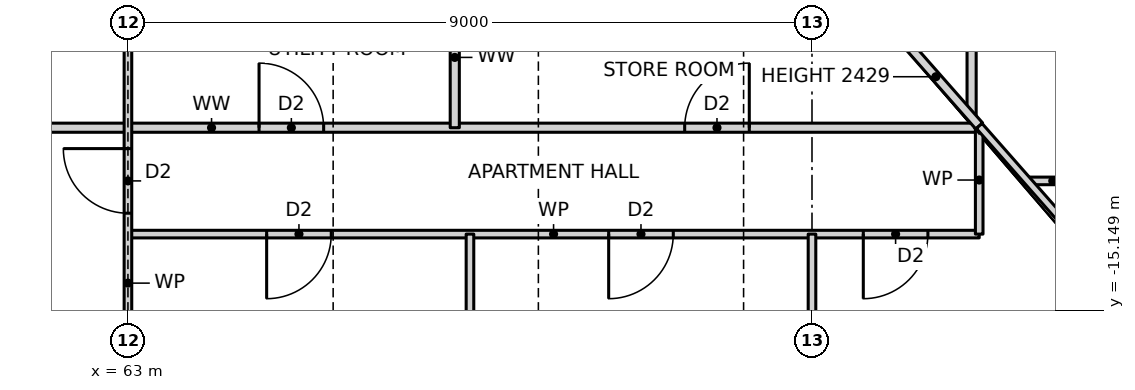
"""IFC4 building model, lengths in metres.
Left out: names, types, materials, properties, quantities, classifications, styles, units other than length and angle.
Written with IfcOpenShell. Run it as: python <this file> out.ifc"""

import sys

from ifc_helpers import new_model, si_unit, direction, frame, frame_2d, origin, place, context, subcontext, project, spatial, rectangle, extrude, element, fill, save


model = new_model("IFC4")
c1 = context("Model", 3, precision=1e-05, world=origin(), true_north=direction((0.0, 1.0)))
c2 = subcontext(c1, "Body", "Model", "MODEL_VIEW")
j1 = project(units=[si_unit("LENGTHUNIT", "METRE"), si_unit("PLANEANGLEUNIT", "RADIAN")], contexts=[c1])
p1 = place(None, origin())
s1 = spatial("IfcSite", under=j1, at=p1, CompositionType="ELEMENT")
p2 = place(p1, origin())
s2 = spatial("IfcBuilding", under=s1, at=p2, CompositionType="ELEMENT")
p3 = place(p2, frame((0.0, 0.0, 22.0)))
s3 = spatial("IfcBuildingStorey", under=s2, at=p3, CompositionType="ELEMENT", Elevation=22.0)
p4 = place(p3, frame((63.0, -14.15, 0.0), z_axis=(0.0, 0.0, 1.0), x_axis=(1.0, 0.0, 0.0)))
e1 = element("IfcWall", 1, at=p4, inside=s3, PredefinedType="PARTITIONING", context=c2, shape_type="SweptSolid", body=[
    extrude(rectangle(XDim=11.2, YDim=0.1, at=frame_2d((5.6, 0.0))), origin(), (0.0, 0.0, 1.0), 3.27),
])
p5 = place(p4, frame((1.825, 0.0, 0.0)))
e2 = element("IfcOpeningElement", 2, at=p5, cuts=e1, PredefinedType="OPENING", context=c2, shape_type="SweptSolid", body=[
    extrude(rectangle(XDim=0.85, YDim=2.1, at=frame_2d((0.425, 1.05))), frame((0.0, 0.06, 0.0), z_axis=(0.0, -1.0, 0.0), x_axis=(1.0, 0.0, 0.0)), (0.0, 0.0, 1.0), 0.12),
])
p6 = place(p4, frame((6.325, 0.0, 0.0)))
e3 = element("IfcOpeningElement", 3, at=p6, cuts=e1, PredefinedType="OPENING", context=c2, shape_type="SweptSolid", body=[
    extrude(rectangle(XDim=0.85, YDim=2.1, at=frame_2d((0.425, 1.05))), frame((0.0, 0.06, 0.0), z_axis=(0.0, -1.0, 0.0), x_axis=(1.0, 0.0, 0.0)), (0.0, 0.0, 1.0), 0.12),
])
p7 = place(p4, frame((9.675, 0.0, 0.0)))
e4 = element("IfcOpeningElement", 4, at=p7, cuts=e1, PredefinedType="OPENING", context=c2, shape_type="SweptSolid", body=[
    extrude(rectangle(XDim=0.85, YDim=2.1, at=frame_2d((0.425, 1.05))), frame((0.0, 0.06, 0.0), z_axis=(0.0, -1.0, 0.0), x_axis=(1.0, 0.0, 0.0)), (0.0, 0.0, 1.0), 0.12),
])
p8 = place(p3, frame((74.836, -13.45, 0.0), z_axis=(0.0, 0.0, 1.0), x_axis=(1.0, 0.0, 0.0)))
e5 = element("IfcWall", 5, at=p8, inside=s3, PredefinedType="PARTITIONING", context=c2, shape_type="SweptSolid", body=[
    extrude(rectangle(XDim=0.664, YDim=0.1, at=frame_2d((0.332, 0.0))), origin(), (0.0, 0.0, 1.0), 3.27),
])
p9 = place(p3, frame((54.0, -12.75, 0.0), z_axis=(0.0, 0.0, 1.0), x_axis=(1.0, 0.0, 0.0)))
e6 = element("IfcWall", 6, at=p9, inside=s3, PredefinedType="PARTITIONING", context=c2, shape_type="SweptSolid", body=[
    extrude(rectangle(XDim=20.2, YDim=0.12, at=frame_2d((10.1, 0.0))), origin(), (0.0, 0.0, 1.0), 3.27),
])
p10 = place(p9, frame((1.375, 0.0, 0.0)))
e7 = element("IfcOpeningElement", 7, at=p10, cuts=e6, PredefinedType="OPENING", context=c2, shape_type="SweptSolid", body=[
    extrude(rectangle(XDim=0.85, YDim=2.1, at=frame_2d((0.425, 1.05))), frame((0.0, 0.07, 0.0), z_axis=(0.0, -1.0, 0.0), x_axis=(1.0, 0.0, 0.0)), (0.0, 0.0, 1.0), 0.14),
])
p11 = place(p9, frame((4.575, 0.0, 0.0)))
e8 = element("IfcOpeningElement", 8, at=p11, cuts=e6, PredefinedType="OPENING", context=c2, shape_type="SweptSolid", body=[
    extrude(rectangle(XDim=0.85, YDim=2.1, at=frame_2d((0.425, 1.05))), frame((0.0, 0.07, 0.0), z_axis=(0.0, -1.0, 0.0), x_axis=(1.0, 0.0, 0.0)), (0.0, 0.0, 1.0), 0.14),
])
p12 = place(p9, frame((10.725, 0.0, 0.0)))
e9 = element("IfcOpeningElement", 9, at=p12, cuts=e6, PredefinedType="OPENING", context=c2, shape_type="SweptSolid", body=[
    extrude(rectangle(XDim=0.85, YDim=2.1, at=frame_2d((0.425, 1.05))), frame((0.0, 0.07, 0.0), z_axis=(0.0, -1.0, 0.0), x_axis=(1.0, 0.0, 0.0)), (0.0, 0.0, 1.0), 0.14),
])
p13 = place(p9, frame((16.325, 0.0, 0.0)))
e10 = element("IfcOpeningElement", 10, at=p13, cuts=e6, PredefinedType="OPENING", context=c2, shape_type="SweptSolid", body=[
    extrude(rectangle(XDim=0.85, YDim=2.1, at=frame_2d((0.425, 1.05))), frame((0.0, 0.07, 0.0), z_axis=(0.0, -1.0, 0.0), x_axis=(1.0, 0.0, 0.0)), (0.0, 0.0, 1.0), 0.14),
])
p14 = place(p3, frame((74.2, -14.15, 0.0), z_axis=(0.0, 0.0, 1.0), x_axis=(0.0, 1.0, 0.0)))
e11 = element("IfcWall", 11, at=p14, inside=s3, PredefinedType="PARTITIONING", context=c2, shape_type="SweptSolid", body=[
    extrude(rectangle(XDim=1.423, YDim=0.1, at=frame_2d((0.711, 0.0))), origin(), (0.0, 0.0, 1.0), 3.27),
])
p15 = place(p3, frame((74.1, -12.614, 0.0), z_axis=(0.0, 0.0, 1.0), x_axis=(0.0, 1.0, 0.0)))
e12 = element("IfcWall", 12, at=p15, inside=s3, PredefinedType="PARTITIONING", context=c2, shape_type="SweptSolid", body=[
    extrude(rectangle(XDim=25.228, YDim=0.12, at=frame_2d((12.614, 0.0))), origin(), (0.0, 0.0, 1.0), 3.27),
])
p16 = place(p15, frame((7.239, 0.0, 0.0)))
e13 = element("IfcOpeningElement", 13, at=p16, cuts=e12, PredefinedType="OPENING", context=c2, shape_type="SweptSolid", body=[
    extrude(rectangle(XDim=0.85, YDim=2.1, at=frame_2d((0.425, 1.05))), frame((0.0, 0.07, 0.0), z_axis=(0.0, -1.0, 0.0), x_axis=(1.0, 0.0, 0.0)), (0.0, 0.0, 1.0), 0.14),
])
p17 = place(p15, frame((10.439, 0.0, 0.0)))
e14 = element("IfcOpeningElement", 14, at=p17, cuts=e12, PredefinedType="OPENING", context=c2, shape_type="SweptSolid", body=[
    extrude(rectangle(XDim=0.85, YDim=2.1, at=frame_2d((0.425, 1.05))), frame((0.0, 0.07, 0.0), z_axis=(0.0, -1.0, 0.0), x_axis=(1.0, 0.0, 0.0)), (0.0, 0.0, 1.0), 0.14),
])
p18 = place(p15, frame((2.507, 0.0, 0.0)))
e15 = element("IfcOpeningElement", 15, at=p18, cuts=e12, PredefinedType="OPENING", context=c2, shape_type="SweptSolid", body=[
    extrude(rectangle(XDim=0.85, YDim=2.1, at=frame_2d((0.425, 1.05))), frame((0.0, 0.07, 0.0), z_axis=(0.0, -1.0, 0.0), x_axis=(1.0, 0.0, 0.0)), (0.0, 0.0, 1.0), 0.14),
])
p19 = place(p15, frame((16.639, 0.0, 0.0)))
e16 = element("IfcOpeningElement", 16, at=p19, cuts=e12, PredefinedType="OPENING", context=c2, shape_type="SweptSolid", body=[
    extrude(rectangle(XDim=0.85, YDim=2.1, at=frame_2d((0.425, 1.05))), frame((0.0, 0.07, 0.0), z_axis=(0.0, -1.0, 0.0), x_axis=(1.0, 0.0, 0.0)), (0.0, 0.0, 1.0), 0.14),
])
p20 = place(p15, frame((21.821, 0.0, 0.0)))
e17 = element("IfcOpeningElement", 17, at=p20, cuts=e12, PredefinedType="OPENING", context=c2, shape_type="SweptSolid", body=[
    extrude(rectangle(XDim=0.85, YDim=2.1, at=frame_2d((0.425, 1.05))), frame((0.0, 0.07, 0.0), z_axis=(0.0, -1.0, 0.0), x_axis=(1.0, 0.0, 0.0)), (0.0, 0.0, 1.0), 0.14),
])
for number, where, z_axis, x_axis in (
    (18, (72.0, -18.69, 0.0), (0.0, 0.0, 1.0), (0.0, 1.0, 0.0)),
    (19, (67.5, -18.69, 0.0), (0.0, 0.0, 1.0), (0.0, 1.0, 0.0)),
):
    element("IfcWall", number, at=place(p3, frame(where, z_axis=z_axis, x_axis=x_axis)), inside=s3, PredefinedType="PARTITIONING", context=c2, shape_type="SweptSolid", body=[
        extrude(rectangle(XDim=4.54, YDim=0.1, at=frame_2d((2.27, 0.0))), origin(), (0.0, 0.0, 1.0), 3.27),
    ])
p21 = place(p3, frame((67.3, -12.75, 0.0), z_axis=(0.0, 0.0, 1.0), x_axis=(0.0, 1.0, 0.0)))
e20 = element("IfcWall", 20, at=p21, inside=s3, PredefinedType="PARTITIONING", context=c2, shape_type="SweptSolid", body=[
    extrude(rectangle(XDim=1.85, YDim=0.12, at=frame_2d((0.925, 0.0))), origin(), (0.0, 0.0, 1.0), 3.27),
])
p22 = place(p3, frame((63.0, -18.69, 0.0), z_axis=(0.0, 0.0, 1.0), x_axis=(0.0, 1.0, 0.0)))
e21 = element("IfcWall", 21, at=p22, inside=s3, PredefinedType="PARTITIONING", context=c2, shape_type="SweptSolid", body=[
    extrude(rectangle(XDim=7.79, YDim=0.1, at=frame_2d((3.895, 0.0))), origin(), (0.0, 0.0, 1.0), 2.587),
])
p23 = place(p22, frame((4.815, 0.0, 0.0)))
e22 = element("IfcOpeningElement", 22, at=p23, cuts=e21, PredefinedType="OPENING", context=c2, shape_type="SweptSolid", body=[
    extrude(rectangle(XDim=0.85, YDim=2.1, at=frame_2d((0.425, 1.05))), frame((0.0, 0.06, 0.0), z_axis=(0.0, -1.0, 0.0), x_axis=(1.0, 0.0, 0.0)), (0.0, 0.0, 1.0), 0.12),
])
p24 = place(p3, frame((74.2, -12.727, 0.0), z_axis=(0.0, 0.0, 1.0), x_axis=(-0.66059344937, 0.75074382758, 0.0)))
e23 = element("IfcWall", 23, at=p24, inside=s3, PredefinedType="PARTITIONING", context=c2, shape_type="SweptSolid", body=[
    extrude(rectangle(XDim=2.876, YDim=0.12, at=frame_2d((1.438, 0.0))), origin(), (0.0, 0.0, 1.0), 2.429),
])
p25 = place(p3, frame((78.057, -17.109, 0.0), z_axis=(0.0, 0.0, 1.0), x_axis=(-0.660654290516, 0.750690287951, 0.0)))
e24 = element("IfcWall", 24, at=p25, inside=s3, PredefinedType="PARTITIONING", context=c2, shape_type="SweptSolid", body=[
    extrude(rectangle(XDim=5.838, YDim=0.1, at=frame_2d((2.919, 0.0))), origin(), (0.0, 0.0, 1.0), 2.429),
])
p26 = place(p23, origin())
e25 = element("IfcDoor", 25, at=p26, inside=s3, OperationType="SINGLE_SWING_RIGHT", PredefinedType="DOOR", context=c2, shape_type="SweptSolid", body=[
    extrude(rectangle(XDim=0.85, YDim=2.1, at=frame_2d((0.425, 1.05))), frame((0.0, 0.025, 0.0), z_axis=(0.0, -1.0, 0.0), x_axis=(1.0, 0.0, 0.0)), (0.0, 0.0, 1.0), 0.05),
])
fill(e22, e25)
p27 = place(p5, frame((0.85, 0.0, 0.0), z_axis=(0.0, 0.0, 1.0), x_axis=(-1.0, 0.0, 0.0)))
e26 = element("IfcDoor", 26, at=p27, inside=s3, OperationType="SINGLE_SWING_RIGHT", PredefinedType="DOOR", context=c2, shape_type="SweptSolid", body=[
    extrude(rectangle(XDim=0.85, YDim=2.1, at=frame_2d((0.425, 1.05))), frame((0.0, 0.025, 0.0), z_axis=(0.0, -1.0, 0.0), x_axis=(1.0, 0.0, 0.0)), (0.0, 0.0, 1.0), 0.05),
])
fill(e2, e26)
p28 = place(p6, frame((0.85, 0.0, 0.0), z_axis=(0.0, 0.0, 1.0), x_axis=(-1.0, 0.0, 0.0)))
e27 = element("IfcDoor", 27, at=p28, inside=s3, OperationType="SINGLE_SWING_RIGHT", PredefinedType="DOOR", context=c2, shape_type="SweptSolid", body=[
    extrude(rectangle(XDim=0.85, YDim=2.1, at=frame_2d((0.425, 1.05))), frame((0.0, 0.025, 0.0), z_axis=(0.0, -1.0, 0.0), x_axis=(1.0, 0.0, 0.0)), (0.0, 0.0, 1.0), 0.05),
])
fill(e3, e27)
p29 = place(p7, frame((0.85, 0.0, 0.0), z_axis=(0.0, 0.0, 1.0), x_axis=(-1.0, 0.0, 0.0)))
e28 = element("IfcDoor", 28, at=p29, inside=s3, OperationType="SINGLE_SWING_RIGHT", PredefinedType="DOOR", context=c2, shape_type="SweptSolid", body=[
    extrude(rectangle(XDim=0.85, YDim=2.1, at=frame_2d((0.425, 1.05))), frame((0.0, 0.025, 0.0), z_axis=(0.0, -1.0, 0.0), x_axis=(1.0, 0.0, 0.0)), (0.0, 0.0, 1.0), 0.05),
])
fill(e4, e28)
p30 = place(p12, origin())
e29 = element("IfcDoor", 29, at=p30, inside=s3, OperationType="SINGLE_SWING_LEFT", PredefinedType="DOOR", context=c2, shape_type="SweptSolid", body=[
    extrude(rectangle(XDim=0.85, YDim=2.1, at=frame_2d((0.425, 1.05))), frame((0.0, 0.025, 0.0), z_axis=(0.0, -1.0, 0.0), x_axis=(1.0, 0.0, 0.0)), (0.0, 0.0, 1.0), 0.05),
])
fill(e9, e29)
p31 = place(p13, origin())
e30 = element("IfcDoor", 30, at=p31, inside=s3, OperationType="SINGLE_SWING_RIGHT", PredefinedType="DOOR", context=c2, shape_type="SweptSolid", body=[
    extrude(rectangle(XDim=0.85, YDim=2.1, at=frame_2d((0.425, 1.05))), frame((0.0, 0.025, 0.0), z_axis=(0.0, -1.0, 0.0), x_axis=(1.0, 0.0, 0.0)), (0.0, 0.0, 1.0), 0.05),
])
fill(e10, e30)
save(model, sys.argv[1])
